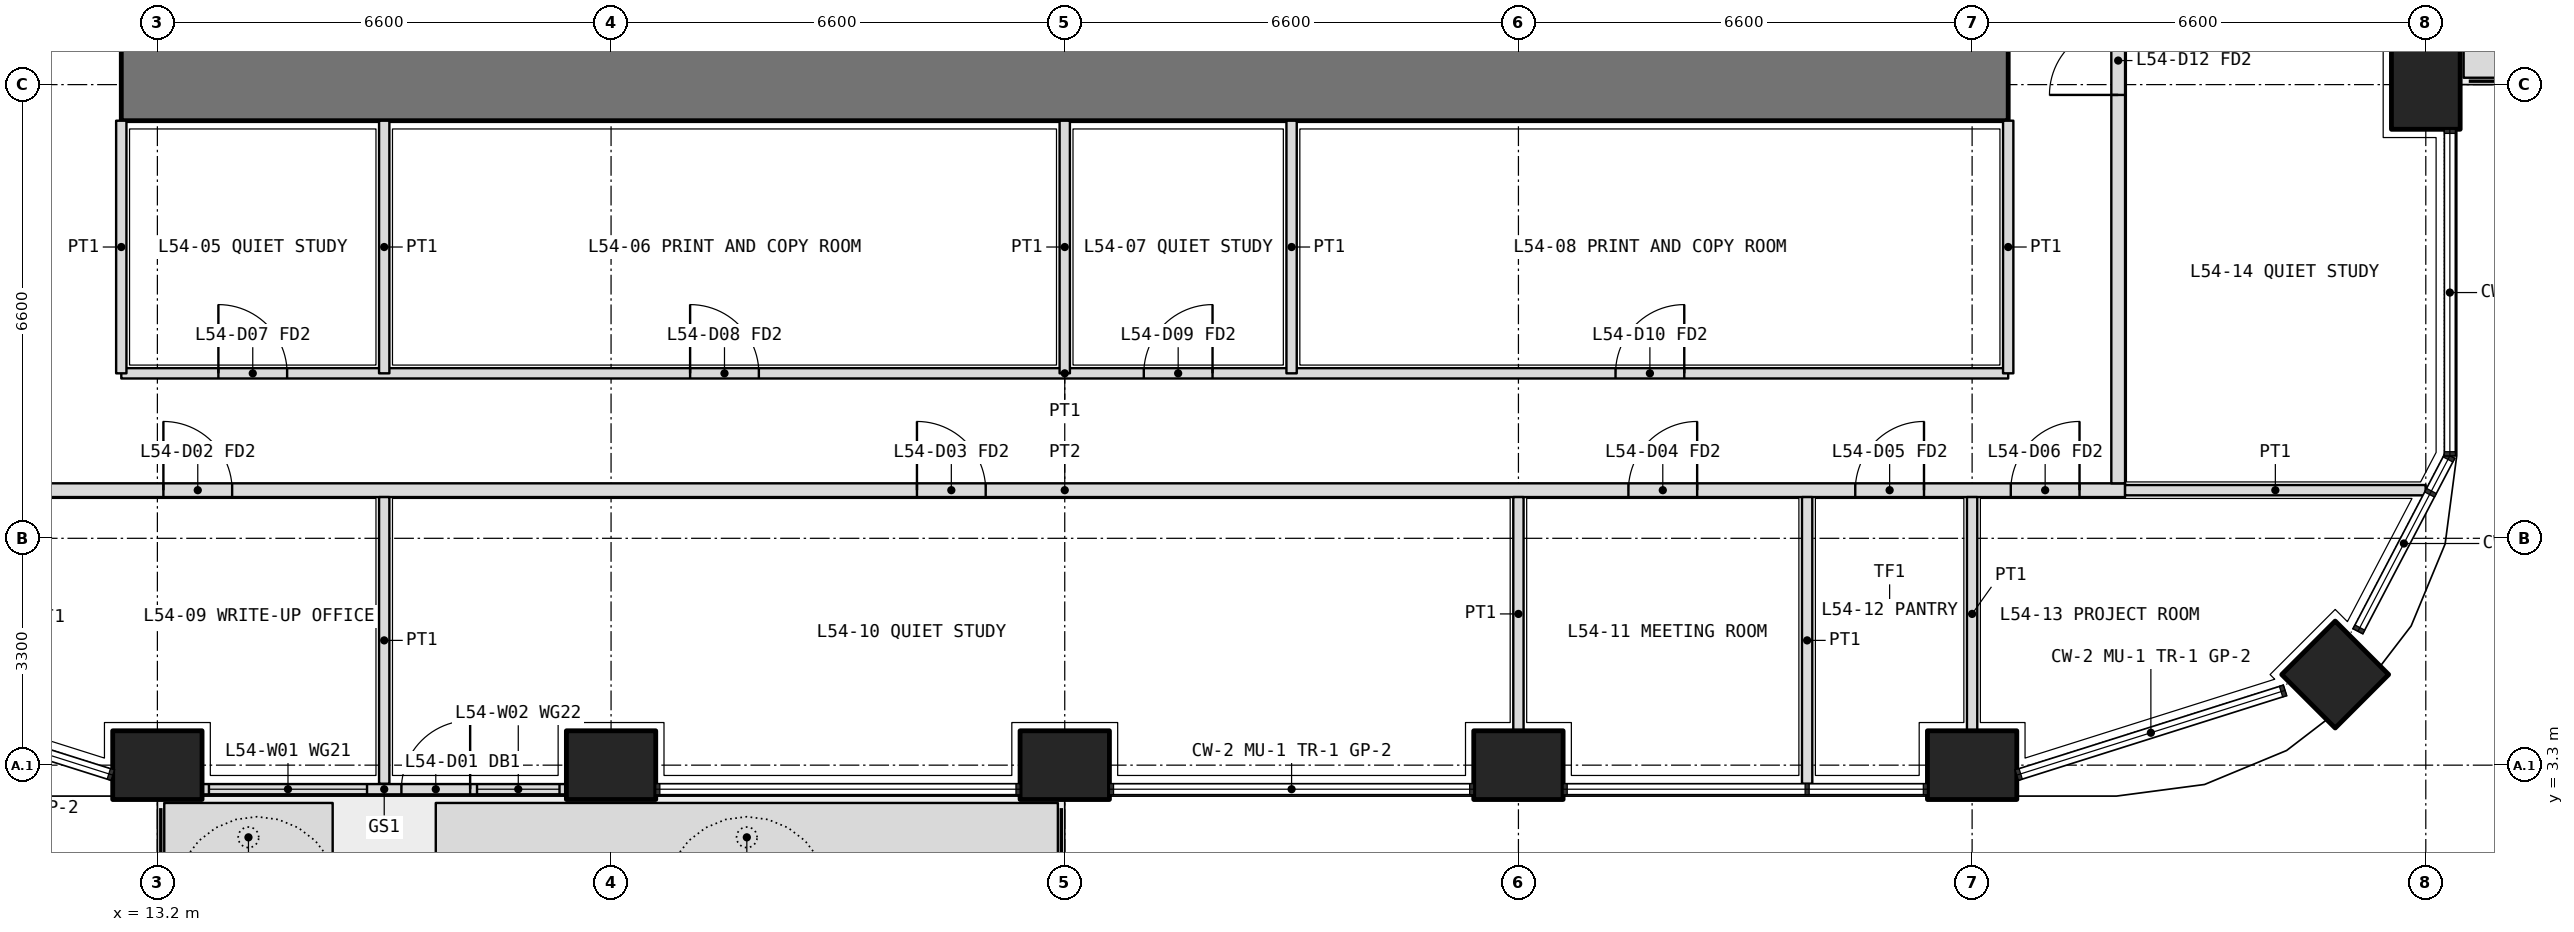
"""IFC4 building model, lengths in metres.
Left out: names, types, materials, properties, quantities, classifications, styles, units other than length and angle.
Written with IfcOpenShell. Run it as: python <this file> out.ifc"""

import sys

from ifc_helpers import new_model, si_unit, direction, frame, frame_2d, origin, origin_2d, place, context, subcontext, project, spatial, polyline, rectangle, outline, extrude, element, fill, save


model = new_model("IFC4")
c1 = context("Model", 3, precision=1e-05, world=origin(), true_north=direction((0.0, 1.0)))
c2 = subcontext(c1, "Body", "Model", "MODEL_VIEW")
j1 = project(units=[si_unit("LENGTHUNIT", "METRE"), si_unit("PLANEANGLEUNIT", "RADIAN")], contexts=[c1])
p1 = place(None, origin())
s1 = spatial("IfcSite", under=j1, at=p1, CompositionType="ELEMENT")
p2 = place(p1, origin())
s2 = spatial("IfcBuilding", under=s1, at=p2, CompositionType="ELEMENT")
p3 = place(p2, frame((0.0, 0.0, 237.6)))
s3 = spatial("IfcBuildingStorey", under=s2, at=p3, CompositionType="ELEMENT", Elevation=237.6)
p4 = place(p3, frame((44.882, 4.618, 0.0), z_axis=(0.0, 0.0, 1.0), x_axis=(0.707106781187, 0.707106781187, 0.0)))
e1 = element("IfcColumn", 1, at=p4, inside=s3, PredefinedType="COLUMN", context=c2, shape_type="SweptSolid", body=[
    extrude(rectangle(XDim=1.1, YDim=1.1, at=origin_2d()), origin(), (0.0, 0.0, 1.0), 4.2),
])
for number, where, z_axis, x_axis in (
    (2, (13.2, 3.3, 0.0), (0.0, 0.0, 1.0), (1.0, 0.0, 0.0)),
    (3, (19.8, 3.3, 0.0), (0.0, 0.0, 1.0), (1.0, 0.0, 0.0)),
    (4, (26.4, 3.3, 0.0), (0.0, 0.0, 1.0), (1.0, 0.0, 0.0)),
    (5, (33.0, 3.3, 0.0), (0.0, 0.0, 1.0), (1.0, 0.0, 0.0)),
    (6, (39.6, 3.3, 0.0), (0.0, 0.0, 1.0), (1.0, 0.0, 0.0)),
    (7, (46.2, 13.2, 0.0), (0.0, 0.0, 1.0), (0.0, 1.0, 0.0)),
):
    element("IfcColumn", number, at=place(p3, frame(where, z_axis=z_axis, x_axis=x_axis)), inside=s3, PredefinedType="COLUMN", context=c2, shape_type="SweptSolid", body=[
        extrude(rectangle(XDim=1.3, YDim=1.0, at=origin_2d()), origin(), (0.0, 0.0, 1.0), 4.2),
    ])
p5 = place(p3, origin())
e8 = element("IfcWall", 8, at=p5, inside=s3, PredefinedType="USERDEFINED", context=c2, shape_type="SweptSolid", body=[
    extrude(outline(polyline([(13.3, 1.75), (15.75, 1.75), (15.75, 2.75), (13.3, 2.75), (13.3, 1.75)]), holes=[polyline([(13.45, 1.9), (15.6, 1.9), (15.6, 2.6), (13.45, 2.6), (13.45, 1.9)])]), origin(), (0.0, 0.0, 1.0), 1.05),
])
p6 = place(p3, origin())
e9 = element("IfcWall", 9, at=p6, inside=s3, PredefinedType="USERDEFINED", context=c2, shape_type="SweptSolid", body=[
    extrude(outline(polyline([(17.25, 1.75), (26.3, 1.75), (26.3, 2.75), (17.25, 2.75), (17.25, 1.75)]), holes=[polyline([(17.4, 1.9), (26.15, 1.9), (26.15, 2.6), (17.4, 2.6), (17.4, 1.9)])]), origin(), (0.0, 0.0, 1.0), 1.05),
])
p7 = place(p3, origin())
e10 = element("IfcWall", 10, at=p7, inside=s3, PredefinedType="USERDEFINED", context=c2, shape_type="SweptSolid", body=[
    extrude(outline(polyline([(46.75, 13.3), (47.75, 13.3), (47.75, 15.75), (46.75, 15.75), (46.75, 13.3)]), holes=[polyline([(46.9, 13.45), (47.6, 13.45), (47.6, 15.6), (46.9, 15.6), (46.9, 13.45)])]), origin(), (0.0, 0.0, 1.0), 1.05),
])
p8 = place(p3, frame((13.85, 2.95, 0.0), z_axis=(0.0, 0.0, 1.0), x_axis=(1.0, 0.0, 0.0)))
e11 = element("IfcWall", 11, at=p8, inside=s3, PredefinedType="SOLIDWALL", context=c2, shape_type="SweptSolid", body=[
    extrude(rectangle(XDim=5.3, YDim=0.15, at=frame_2d((2.65, 0.0))), origin(), (0.0, 0.0, 1.0), 2.7),
])
p9 = place(p8, frame((2.9, 0.0, 0.0)))
e12 = element("IfcOpeningElement", 12, at=p9, cuts=e11, PredefinedType="OPENING", context=c2, shape_type="SweptSolid", body=[
    extrude(rectangle(XDim=1.0, YDim=2.4, at=frame_2d((0.5, 1.2))), frame((0.0, 0.085, 0.0), z_axis=(0.0, -1.0, 0.0), x_axis=(1.0, 0.0, 0.0)), (0.0, 0.0, 1.0), 0.17),
])
p10 = place(p8, frame((0.1, 0.0, 0.1)))
e13 = element("IfcOpeningElement", 13, at=p10, cuts=e11, PredefinedType="OPENING", context=c2, shape_type="SweptSolid", body=[
    extrude(rectangle(XDim=2.3, YDim=2.3, at=frame_2d((1.15, 1.15))), frame((0.0, 0.085, 0.0), z_axis=(0.0, -1.0, 0.0), x_axis=(1.0, 0.0, 0.0)), (0.0, 0.0, 1.0), 0.17),
])
p11 = place(p8, frame((4.0, 0.0, 0.1)))
e14 = element("IfcOpeningElement", 14, at=p11, cuts=e11, PredefinedType="OPENING", context=c2, shape_type="SweptSolid", body=[
    extrude(rectangle(XDim=1.2, YDim=2.3, at=frame_2d((0.6, 1.15))), frame((0.0, 0.085, 0.0), z_axis=(0.0, -1.0, 0.0), x_axis=(1.0, 0.0, 0.0)), (0.0, 0.0, 1.0), 0.17),
])
p12 = place(p3, frame((12.675, 13.2, 0.0), z_axis=(0.0, 0.0, 1.0), x_axis=(1.0, 0.0, 0.0)))
e15 = element("IfcWall", 15, at=p12, inside=s3, PredefinedType="SHEAR", context=c2, shape_type="SweptSolid", body=[
    extrude(rectangle(XDim=27.45, YDim=1.05, at=frame_2d((13.725, 0.0))), origin(), (0.0, 0.0, 1.0), 4.2),
])
p13 = place(p3, frame((12.675, 9.0, 0.0), z_axis=(0.0, 0.0, 1.0), x_axis=(1.0, 0.0, 0.0)))
e16 = element("IfcWall", 16, at=p13, inside=s3, PredefinedType="PARTITIONING", context=c2, shape_type="SweptSolid", body=[
    extrude(rectangle(XDim=27.45, YDim=0.15, at=frame_2d((13.725, 0.0))), origin(), (0.0, 0.0, 1.0), 3.0),
])
p14 = place(p13, frame((1.413, 0.0, 0.0)))
e17 = element("IfcOpeningElement", 17, at=p14, cuts=e16, PredefinedType="OPENING", context=c2, shape_type="SweptSolid", body=[
    extrude(rectangle(XDim=1.0, YDim=2.1, at=frame_2d((0.5, 1.05))), frame((0.0, 0.085, 0.0), z_axis=(0.0, -1.0, 0.0), x_axis=(1.0, 0.0, 0.0)), (0.0, 0.0, 1.0), 0.17),
])
p15 = place(p13, frame((8.275, 0.0, 0.0)))
e18 = element("IfcOpeningElement", 18, at=p15, cuts=e16, PredefinedType="OPENING", context=c2, shape_type="SweptSolid", body=[
    extrude(rectangle(XDim=1.0, YDim=2.1, at=frame_2d((0.5, 1.05))), frame((0.0, 0.085, 0.0), z_axis=(0.0, -1.0, 0.0), x_axis=(1.0, 0.0, 0.0)), (0.0, 0.0, 1.0), 0.17),
])
p16 = place(p13, frame((14.875, 0.0, 0.0)))
e19 = element("IfcOpeningElement", 19, at=p16, cuts=e16, PredefinedType="OPENING", context=c2, shape_type="SweptSolid", body=[
    extrude(rectangle(XDim=1.0, YDim=2.1, at=frame_2d((0.5, 1.05))), frame((0.0, 0.085, 0.0), z_axis=(0.0, -1.0, 0.0), x_axis=(1.0, 0.0, 0.0)), (0.0, 0.0, 1.0), 0.17),
])
p17 = place(p13, frame((21.738, 0.0, 0.0)))
e20 = element("IfcOpeningElement", 20, at=p17, cuts=e16, PredefinedType="OPENING", context=c2, shape_type="SweptSolid", body=[
    extrude(rectangle(XDim=1.0, YDim=2.1, at=frame_2d((0.5, 1.05))), frame((0.0, 0.085, 0.0), z_axis=(0.0, -1.0, 0.0), x_axis=(1.0, 0.0, 0.0)), (0.0, 0.0, 1.0), 0.17),
])
for number, where, z_axis, x_axis in (
    (21, (12.675, 12.675, 0.0), (0.0, 0.0, 1.0), (0.0, -1.0, 0.0)),
    (22, (40.125, 12.675, 0.0), (0.0, 0.0, 1.0), (0.0, -1.0, 0.0)),
):
    element("IfcWall", number, at=place(p3, frame(where, z_axis=z_axis, x_axis=x_axis)), inside=s3, PredefinedType="PARTITIONING", context=c2, shape_type="SweptSolid", body=[
        extrude(rectangle(XDim=3.675, YDim=0.15, at=frame_2d((1.837, 0.0))), origin(), (0.0, 0.0, 1.0), 3.0),
    ])
p18 = place(p3, frame((16.5, 12.675, 0.0), z_axis=(0.0, 0.0, 1.0), x_axis=(0.0, -1.0, 0.0)))
e23 = element("IfcWall", 23, at=p18, inside=s3, PredefinedType="PARTITIONING", context=c2, shape_type="SweptSolid", body=[
    extrude(rectangle(XDim=3.675, YDim=0.15, at=frame_2d((1.837, 0.0))), origin(), (0.0, 0.0, 1.0), 3.9),
])
p19 = place(p3, frame((26.4, 12.675, 0.0), z_axis=(0.0, 0.0, 1.0), x_axis=(0.0, -1.0, 0.0)))
e24 = element("IfcWall", 24, at=p19, inside=s3, PredefinedType="PARTITIONING", context=c2, shape_type="SweptSolid", body=[
    extrude(rectangle(XDim=3.675, YDim=0.15, at=frame_2d((1.837, 0.0))), origin(), (0.0, 0.0, 1.0), 3.0),
])
p20 = place(p3, frame((29.7, 12.675, 0.0), z_axis=(0.0, 0.0, 1.0), x_axis=(0.0, -1.0, 0.0)))
e25 = element("IfcWall", 25, at=p20, inside=s3, PredefinedType="PARTITIONING", context=c2, shape_type="SweptSolid", body=[
    extrude(rectangle(XDim=3.675, YDim=0.15, at=frame_2d((1.837, 0.0))), origin(), (0.0, 0.0, 1.0), 3.9),
])
p21 = place(p3, frame((10.975, 7.3, 0.0), z_axis=(0.0, 0.0, 1.0), x_axis=(1.0, 0.0, 0.0)))
e26 = element("IfcWall", 26, at=p21, inside=s3, PredefinedType="PARTITIONING", context=c2, shape_type="SweptSolid", body=[
    extrude(rectangle(XDim=30.85, YDim=0.2, at=frame_2d((15.425, 0.0))), origin(), (0.0, 0.0, 1.0), 3.0),
])
p22 = place(p21, frame((2.312, 0.0, 0.0)))
e27 = element("IfcOpeningElement", 27, at=p22, cuts=e26, PredefinedType="OPENING", context=c2, shape_type="SweptSolid", body=[
    extrude(rectangle(XDim=1.0, YDim=2.1, at=frame_2d((0.5, 1.05))), frame((0.0, 0.11, 0.0), z_axis=(0.0, -1.0, 0.0), x_axis=(1.0, 0.0, 0.0)), (0.0, 0.0, 1.0), 0.22),
])
p23 = place(p21, frame((13.275, 0.0, 0.0)))
e28 = element("IfcOpeningElement", 28, at=p23, cuts=e26, PredefinedType="OPENING", context=c2, shape_type="SweptSolid", body=[
    extrude(rectangle(XDim=1.0, YDim=2.1, at=frame_2d((0.5, 1.05))), frame((0.0, 0.11, 0.0), z_axis=(0.0, -1.0, 0.0), x_axis=(1.0, 0.0, 0.0)), (0.0, 0.0, 1.0), 0.22),
])
p24 = place(p21, frame((23.625, 0.0, 0.0)))
e29 = element("IfcOpeningElement", 29, at=p24, cuts=e26, PredefinedType="OPENING", context=c2, shape_type="SweptSolid", body=[
    extrude(rectangle(XDim=1.0, YDim=2.1, at=frame_2d((0.5, 1.05))), frame((0.0, 0.11, 0.0), z_axis=(0.0, -1.0, 0.0), x_axis=(1.0, 0.0, 0.0)), (0.0, 0.0, 1.0), 0.22),
])
p25 = place(p21, frame((26.925, 0.0, 0.0)))
e30 = element("IfcOpeningElement", 30, at=p25, cuts=e26, PredefinedType="OPENING", context=c2, shape_type="SweptSolid", body=[
    extrude(rectangle(XDim=1.0, YDim=2.1, at=frame_2d((0.5, 1.05))), frame((0.0, 0.11, 0.0), z_axis=(0.0, -1.0, 0.0), x_axis=(1.0, 0.0, 0.0)), (0.0, 0.0, 1.0), 0.22),
])
p26 = place(p21, frame((29.188, 0.0, 0.0)))
e31 = element("IfcOpeningElement", 31, at=p26, cuts=e26, PredefinedType="OPENING", context=c2, shape_type="SweptSolid", body=[
    extrude(rectangle(XDim=1.0, YDim=2.1, at=frame_2d((0.5, 1.05))), frame((0.0, 0.11, 0.0), z_axis=(0.0, -1.0, 0.0), x_axis=(1.0, 0.0, 0.0)), (0.0, 0.0, 1.0), 0.22),
])
p27 = place(p3, frame((41.725, 7.4, 0.0), z_axis=(0.0, 0.0, 1.0), x_axis=(0.0, 1.0, 0.0)))
e32 = element("IfcWall", 32, at=p27, inside=s3, PredefinedType="PARTITIONING", context=c2, shape_type="SweptSolid", body=[
    extrude(rectangle(XDim=31.4, YDim=0.2, at=frame_2d((15.7, 0.0))), origin(), (0.0, 0.0, 1.0), 3.0),
])
p28 = place(p27, frame((5.65, 0.0, 0.0)))
e33 = element("IfcOpeningElement", 33, at=p28, cuts=e32, PredefinedType="OPENING", context=c2, shape_type="SweptSolid", body=[
    extrude(rectangle(XDim=1.0, YDim=2.1, at=frame_2d((0.5, 1.05))), frame((0.0, 0.11, 0.0), z_axis=(0.0, -1.0, 0.0), x_axis=(1.0, 0.0, 0.0)), (0.0, 0.0, 1.0), 0.22),
])
p29 = place(p27, frame((13.4, 0.0, 0.0)))
e34 = element("IfcOpeningElement", 34, at=p29, cuts=e32, PredefinedType="OPENING", context=c2, shape_type="SweptSolid", body=[
    extrude(rectangle(XDim=1.0, YDim=2.1, at=frame_2d((0.5, 1.05))), frame((0.0, 0.11, 0.0), z_axis=(0.0, -1.0, 0.0), x_axis=(1.0, 0.0, 0.0)), (0.0, 0.0, 1.0), 0.22),
])
p30 = place(p27, frame((16.75, 0.0, 0.0)))
e35 = element("IfcOpeningElement", 35, at=p30, cuts=e32, PredefinedType="OPENING", context=c2, shape_type="SweptSolid", body=[
    extrude(rectangle(XDim=0.9, YDim=2.1, at=frame_2d((0.45, 1.05))), frame((0.0, 0.11, 0.0), z_axis=(0.0, -1.0, 0.0), x_axis=(1.0, 0.0, 0.0)), (0.0, 0.0, 1.0), 0.22),
])
p31 = place(p27, frame((20.15, 0.0, 0.0)))
e36 = element("IfcOpeningElement", 36, at=p31, cuts=e32, PredefinedType="OPENING", context=c2, shape_type="SweptSolid", body=[
    extrude(rectangle(XDim=1.0, YDim=2.1, at=frame_2d((0.5, 1.05))), frame((0.0, 0.11, 0.0), z_axis=(0.0, -1.0, 0.0), x_axis=(1.0, 0.0, 0.0)), (0.0, 0.0, 1.0), 0.22),
])
p32 = place(p27, frame((26.4, 0.0, 0.0)))
e37 = element("IfcOpeningElement", 37, at=p32, cuts=e32, PredefinedType="OPENING", context=c2, shape_type="SweptSolid", body=[
    extrude(rectangle(XDim=1.0, YDim=2.1, at=frame_2d((0.5, 1.05))), frame((0.0, 0.11, 0.0), z_axis=(0.0, -1.0, 0.0), x_axis=(1.0, 0.0, 0.0)), (0.0, 0.0, 1.0), 0.22),
])
p33 = place(p3, frame((46.198, 7.3, 0.0), z_axis=(0.0, 0.0, 1.0), x_axis=(-1.0, 0.0, 0.0)))
e38 = element("IfcWall", 38, at=p33, inside=s3, PredefinedType="PARTITIONING", context=c2, shape_type="SweptSolid", body=[
    extrude(rectangle(XDim=4.373, YDim=0.15, at=frame_2d((2.186, 0.0))), origin(), (0.0, 0.0, 1.0), 2.7),
])
for number, where, z_axis, x_axis in (
    (39, (37.2, 3.03, 0.0), (0.0, 0.0, 1.0), (0.0, 1.0, 0.0)),
    (40, (16.5, 3.03, 0.0), (0.0, 0.0, 1.0), (0.0, 1.0, 0.0)),
):
    element("IfcWall", number, at=place(p3, frame(where, z_axis=z_axis, x_axis=x_axis)), inside=s3, PredefinedType="PARTITIONING", context=c2, shape_type="SweptSolid", body=[
        extrude(rectangle(XDim=4.17, YDim=0.15, at=frame_2d((2.085, 0.0))), origin(), (0.0, 0.0, 1.0), 2.7),
    ])
for number, where, z_axis, x_axis in (
    (41, (33.0, 3.8, 0.0), (0.0, 0.0, 1.0), (0.0, 1.0, 0.0)),
    (42, (39.6, 3.8, 0.0), (0.0, 0.0, 1.0), (0.0, 1.0, 0.0)),
):
    element("IfcWall", number, at=place(p3, frame(where, z_axis=z_axis, x_axis=x_axis)), inside=s3, PredefinedType="PARTITIONING", context=c2, shape_type="SweptSolid", body=[
        extrude(rectangle(XDim=3.4, YDim=0.15, at=frame_2d((1.7, 0.0))), origin(), (0.0, 0.0, 1.0), 3.0),
    ])
p34 = place(p9, origin())
e43 = element("IfcDoor", 43, at=p34, inside=s3, OperationType="SINGLE_SWING_RIGHT", PredefinedType="DOOR", context=c2, shape_type="SweptSolid", body=[
    extrude(rectangle(XDim=1.0, YDim=2.4, at=frame_2d((0.5, 1.2))), frame((0.0, 0.025, 0.0), z_axis=(0.0, -1.0, 0.0), x_axis=(1.0, 0.0, 0.0)), (0.0, 0.0, 1.0), 0.05),
])
fill(e12, e43)
p35 = place(p10, origin())
e44 = element("IfcWindow", 44, at=p35, inside=s3, PartitioningType="SINGLE_PANEL", PredefinedType="WINDOW", context=c2, shape_type="SweptSolid", body=[
    extrude(rectangle(XDim=2.3, YDim=2.3, at=frame_2d((1.15, 1.15))), frame((0.0, 0.03, 0.0), z_axis=(0.0, -1.0, 0.0), x_axis=(1.0, 0.0, 0.0)), (0.0, 0.0, 1.0), 0.06),
])
fill(e13, e44)
p36 = place(p11, origin())
e45 = element("IfcWindow", 45, at=p36, inside=s3, PartitioningType="SINGLE_PANEL", PredefinedType="WINDOW", context=c2, shape_type="SweptSolid", body=[
    extrude(rectangle(XDim=1.2, YDim=2.3, at=frame_2d((0.6, 1.15))), frame((0.0, 0.03, 0.0), z_axis=(0.0, -1.0, 0.0), x_axis=(1.0, 0.0, 0.0)), (0.0, 0.0, 1.0), 0.06),
])
fill(e14, e45)
p37 = place(p14, origin())
e46 = element("IfcDoor", 46, at=p37, inside=s3, OperationType="SINGLE_SWING_LEFT", PredefinedType="DOOR", context=c2, shape_type="SweptSolid", body=[
    extrude(rectangle(XDim=1.0, YDim=2.1, at=frame_2d((0.5, 1.05))), frame((0.0, 0.025, 0.0), z_axis=(0.0, -1.0, 0.0), x_axis=(1.0, 0.0, 0.0)), (0.0, 0.0, 1.0), 0.05),
])
fill(e17, e46)
p38 = place(p15, origin())
e47 = element("IfcDoor", 47, at=p38, inside=s3, OperationType="SINGLE_SWING_LEFT", PredefinedType="DOOR", context=c2, shape_type="SweptSolid", body=[
    extrude(rectangle(XDim=1.0, YDim=2.1, at=frame_2d((0.5, 1.05))), frame((0.0, 0.025, 0.0), z_axis=(0.0, -1.0, 0.0), x_axis=(1.0, 0.0, 0.0)), (0.0, 0.0, 1.0), 0.05),
])
fill(e18, e47)
p39 = place(p16, origin())
e48 = element("IfcDoor", 48, at=p39, inside=s3, OperationType="SINGLE_SWING_RIGHT", PredefinedType="DOOR", context=c2, shape_type="SweptSolid", body=[
    extrude(rectangle(XDim=1.0, YDim=2.1, at=frame_2d((0.5, 1.05))), frame((0.0, 0.025, 0.0), z_axis=(0.0, -1.0, 0.0), x_axis=(1.0, 0.0, 0.0)), (0.0, 0.0, 1.0), 0.05),
])
fill(e19, e48)
p40 = place(p17, origin())
e49 = element("IfcDoor", 49, at=p40, inside=s3, OperationType="SINGLE_SWING_RIGHT", PredefinedType="DOOR", context=c2, shape_type="SweptSolid", body=[
    extrude(rectangle(XDim=1.0, YDim=2.1, at=frame_2d((0.5, 1.05))), frame((0.0, 0.025, 0.0), z_axis=(0.0, -1.0, 0.0), x_axis=(1.0, 0.0, 0.0)), (0.0, 0.0, 1.0), 0.05),
])
fill(e20, e49)
p41 = place(p22, origin())
e50 = element("IfcDoor", 50, at=p41, inside=s3, OperationType="SINGLE_SWING_LEFT", PredefinedType="DOOR", context=c2, shape_type="SweptSolid", body=[
    extrude(rectangle(XDim=1.0, YDim=2.1, at=frame_2d((0.5, 1.05))), frame((0.0, 0.025, 0.0), z_axis=(0.0, -1.0, 0.0), x_axis=(1.0, 0.0, 0.0)), (0.0, 0.0, 1.0), 0.05),
])
fill(e27, e50)
p42 = place(p23, origin())
e51 = element("IfcDoor", 51, at=p42, inside=s3, OperationType="SINGLE_SWING_LEFT", PredefinedType="DOOR", context=c2, shape_type="SweptSolid", body=[
    extrude(rectangle(XDim=1.0, YDim=2.1, at=frame_2d((0.5, 1.05))), frame((0.0, 0.025, 0.0), z_axis=(0.0, -1.0, 0.0), x_axis=(1.0, 0.0, 0.0)), (0.0, 0.0, 1.0), 0.05),
])
fill(e28, e51)
p43 = place(p24, origin())
e52 = element("IfcDoor", 52, at=p43, inside=s3, OperationType="SINGLE_SWING_RIGHT", PredefinedType="DOOR", context=c2, shape_type="SweptSolid", body=[
    extrude(rectangle(XDim=1.0, YDim=2.1, at=frame_2d((0.5, 1.05))), frame((0.0, 0.025, 0.0), z_axis=(0.0, -1.0, 0.0), x_axis=(1.0, 0.0, 0.0)), (0.0, 0.0, 1.0), 0.05),
])
fill(e29, e52)
p44 = place(p25, origin())
e53 = element("IfcDoor", 53, at=p44, inside=s3, OperationType="SINGLE_SWING_RIGHT", PredefinedType="DOOR", context=c2, shape_type="SweptSolid", body=[
    extrude(rectangle(XDim=1.0, YDim=2.1, at=frame_2d((0.5, 1.05))), frame((0.0, 0.025, 0.0), z_axis=(0.0, -1.0, 0.0), x_axis=(1.0, 0.0, 0.0)), (0.0, 0.0, 1.0), 0.05),
])
fill(e30, e53)
p45 = place(p26, origin())
e54 = element("IfcDoor", 54, at=p45, inside=s3, OperationType="SINGLE_SWING_RIGHT", PredefinedType="DOOR", context=c2, shape_type="SweptSolid", body=[
    extrude(rectangle(XDim=1.0, YDim=2.1, at=frame_2d((0.5, 1.05))), frame((0.0, 0.025, 0.0), z_axis=(0.0, -1.0, 0.0), x_axis=(1.0, 0.0, 0.0)), (0.0, 0.0, 1.0), 0.05),
])
fill(e31, e54)
p46 = place(p28, origin())
e55 = element("IfcDoor", 55, at=p46, inside=s3, OperationType="SINGLE_SWING_LEFT", PredefinedType="DOOR", context=c2, shape_type="SweptSolid", body=[
    extrude(rectangle(XDim=1.0, YDim=2.1, at=frame_2d((0.5, 1.05))), frame((0.0, 0.025, 0.0), z_axis=(0.0, -1.0, 0.0), x_axis=(1.0, 0.0, 0.0)), (0.0, 0.0, 1.0), 0.05),
])
fill(e33, e55)
save(model, sys.argv[1])
